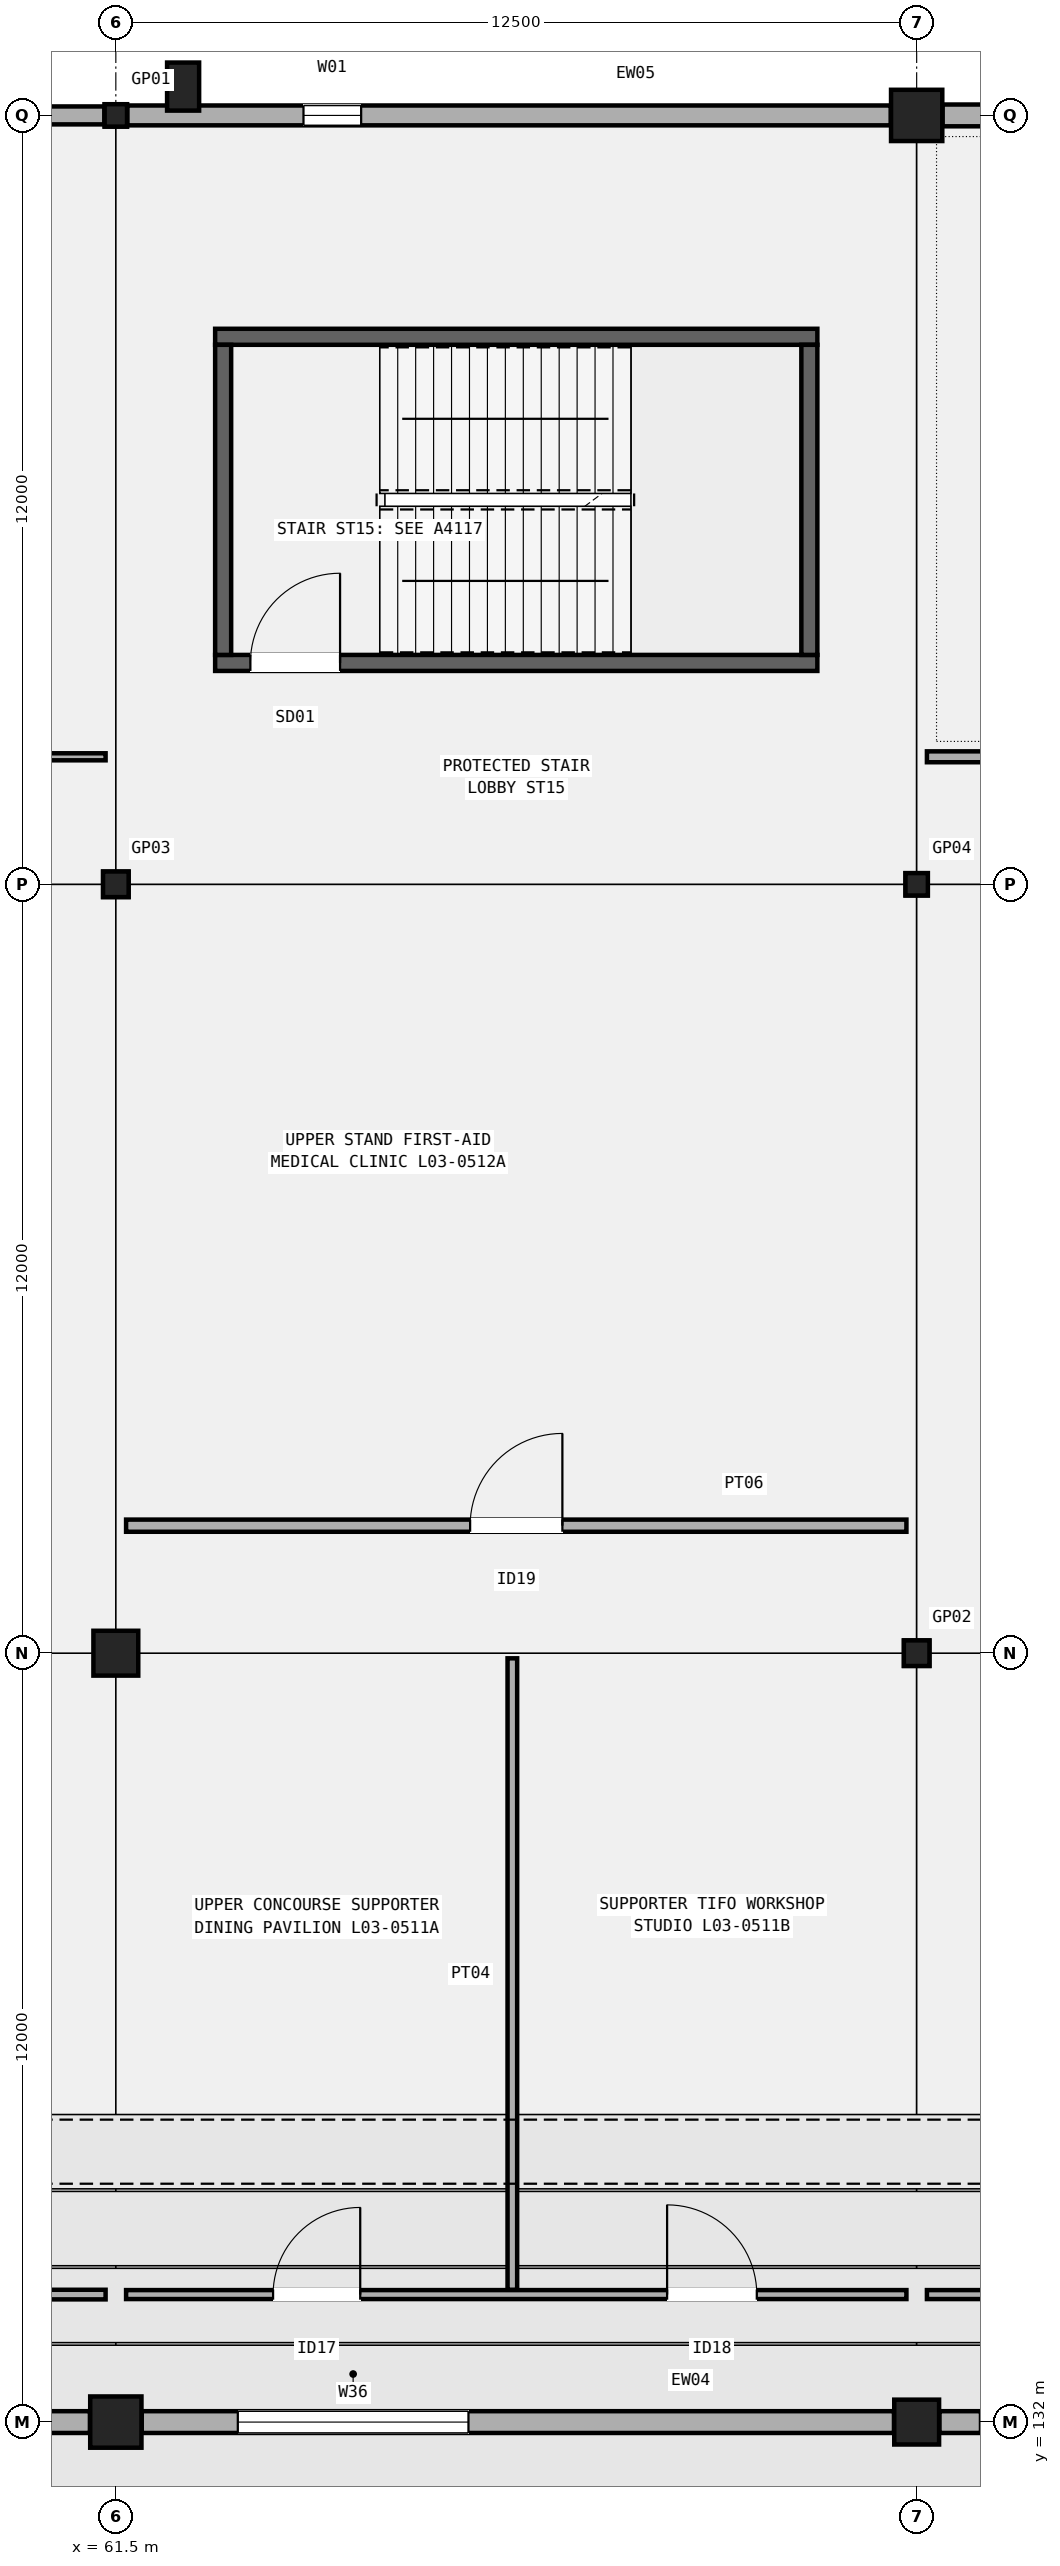
"""IFC4 building model, lengths in metres.
Left out: names, types, materials, properties, quantities, classifications, styles, units other than length and angle.
Written with IfcOpenShell. Run it as: python <this file> out.ifc"""

import sys

from ifc_helpers import new_model, si_unit, direction, frame, frame_2d, origin, origin_2d, place, context, subcontext, project, spatial, rectangle, hollow_rectangle, extrude, element, fill, save


model = new_model("IFC4")
c1 = context("Model", 3, precision=1e-05, world=origin(), true_north=direction((0.0, 1.0)))
c2 = subcontext(c1, "Body", "Model", "MODEL_VIEW")
j1 = project(units=[si_unit("LENGTHUNIT", "METRE"), si_unit("PLANEANGLEUNIT", "RADIAN")], contexts=[c1])
p1 = place(None, origin())
s1 = spatial("IfcSite", under=j1, at=p1, CompositionType="ELEMENT")
p2 = place(p1, origin())
s2 = spatial("IfcBuilding", under=s1, at=p2, CompositionType="ELEMENT")
p3 = place(p2, frame((0.0, 0.0, 15.3)))
s3 = spatial("IfcBuildingStorey", under=s2, at=p3, CompositionType="ELEMENT", Elevation=15.3)
p4 = place(p3, frame((61.5, 132.0, 0.0), z_axis=(0.0, 0.0, 1.0), x_axis=(1.0, 0.0, 0.0)))
e1 = element("IfcColumn", 1, at=p4, inside=s3, PredefinedType="COLUMN", context=c2, shape_type="SweptSolid", body=[
    extrude(rectangle(XDim=0.8, YDim=0.8, at=origin_2d()), origin(), (0.0, 0.0, 1.0), 5.1),
])
p5 = place(p3, frame((61.5, 144.0, 0.0), z_axis=(0.0, 0.0, 1.0), x_axis=(1.0, 0.0, 0.0)))
e2 = element("IfcColumn", 2, at=p5, inside=s3, PredefinedType="COLUMN", context=c2, shape_type="SweptSolid", body=[
    extrude(rectangle(XDim=0.7, YDim=0.7, at=origin_2d()), origin(), (0.0, 0.0, 1.0), 5.1),
])
p6 = place(p3, frame((61.5, 156.0, 0.0), z_axis=(0.0, 0.0, 1.0), x_axis=(1.0, 0.0, 0.0)))
e3 = element("IfcColumn", 3, at=p6, inside=s3, PredefinedType="COLUMN", context=c2, shape_type="SweptSolid", body=[
    extrude(hollow_rectangle(XDim=0.4, YDim=0.4, WallThickness=0.016, InnerFilletRadius=0.016, OuterFilletRadius=0.032, at=origin_2d()), origin(), (0.0, 0.0, 1.0), 5.1),
])
p7 = place(p3, frame((61.5, 168.0, 0.0), z_axis=(0.0, 0.0, 1.0), x_axis=(1.0, 0.0, 0.0)))
e4 = element("IfcColumn", 4, at=p7, inside=s3, PredefinedType="COLUMN", context=c2, shape_type="SweptSolid", body=[
    extrude(hollow_rectangle(XDim=0.35, YDim=0.35, WallThickness=0.016, InnerFilletRadius=0.016, OuterFilletRadius=0.032, at=origin_2d()), origin(), (0.0, 0.0, 1.0), 5.1),
])
p8 = place(p3, frame((74.0, 132.0, 0.0), z_axis=(0.0, 0.0, 1.0), x_axis=(1.0, 0.0, 0.0)))
e5 = element("IfcColumn", 5, at=p8, inside=s3, PredefinedType="COLUMN", context=c2, shape_type="SweptSolid", body=[
    extrude(rectangle(XDim=0.7, YDim=0.7, at=origin_2d()), origin(), (0.0, 0.0, 1.0), 5.1),
])
p9 = place(p3, frame((74.0, 144.0, 0.0), z_axis=(0.0, 0.0, 1.0), x_axis=(1.0, 0.0, 0.0)))
e6 = element("IfcColumn", 6, at=p9, inside=s3, PredefinedType="COLUMN", context=c2, shape_type="SweptSolid", body=[
    extrude(hollow_rectangle(XDim=0.4, YDim=0.4, WallThickness=0.016, InnerFilletRadius=0.016, OuterFilletRadius=0.032, at=origin_2d()), origin(), (0.0, 0.0, 1.0), 5.1),
])
p10 = place(p3, frame((74.0, 156.0, 0.0), z_axis=(0.0, 0.0, 1.0), x_axis=(1.0, 0.0, 0.0)))
e7 = element("IfcColumn", 7, at=p10, inside=s3, PredefinedType="COLUMN", context=c2, shape_type="SweptSolid", body=[
    extrude(hollow_rectangle(XDim=0.35, YDim=0.35, WallThickness=0.016, InnerFilletRadius=0.016, OuterFilletRadius=0.032, at=origin_2d()), origin(), (0.0, 0.0, 1.0), 5.1),
])
p11 = place(p3, frame((74.0, 168.0, 0.0), z_axis=(0.0, 0.0, 1.0), x_axis=(1.0, 0.0, 0.0)))
e8 = element("IfcColumn", 8, at=p11, inside=s3, PredefinedType="COLUMN", context=c2, shape_type="SweptSolid", body=[
    extrude(rectangle(XDim=0.8, YDim=0.8, at=origin_2d()), origin(), (0.0, 0.0, 1.0), 5.1),
])
p12 = place(p3, frame((62.55, 168.45, 0.0), z_axis=(0.0, 0.0, 1.0), x_axis=(1.0, 0.0, 0.0)))
e9 = element("IfcColumn", 9, at=p12, inside=s3, PredefinedType="PILASTER", context=c2, shape_type="SweptSolid", body=[
    extrude(rectangle(XDim=0.5, YDim=0.75, at=origin_2d()), origin(), (0.0, 0.0, 1.0), 5.1),
])
p13 = place(p3, frame((60.446, 132.0, 0.0), z_axis=(0.0, 0.0, 1.0), x_axis=(1.0, 0.0, 0.0)))
e10 = element("IfcWall", 10, at=p13, inside=s3, PredefinedType="SOLIDWALL", context=c2, shape_type="SweptSolid", body=[
    extrude(rectangle(XDim=0.65, YDim=0.34, at=frame_2d((0.325, 0.0))), origin(), (0.0, 0.0, 1.0), 4.06),
])
p14 = place(p3, frame((49.204, 168.0, 0.0), z_axis=(0.0, 0.0, 1.0), x_axis=(1.0, 0.0, 0.0)))
e11 = element("IfcWall", 11, at=p14, inside=s3, PredefinedType="SOLIDWALL", context=c2, shape_type="SweptSolid", body=[
    extrude(rectangle(XDim=12.117, YDim=0.28, at=frame_2d((6.059, 0.0))), origin(), (0.0, 0.0, 1.0), 4.06),
])
p15 = place(p14, frame((1.5, 0.0, 0.95)))
e12 = element("IfcOpeningElement", 12, at=p15, cuts=e11, PredefinedType="OPENING", context=c2, shape_type="SweptSolid", body=[
    extrude(rectangle(XDim=3.3, YDim=2.25, at=frame_2d((1.65, 1.125))), frame((0.0, 0.15, 0.0), z_axis=(0.0, -1.0, 0.0), x_axis=(1.0, 0.0, 0.0)), (0.0, 0.0, 1.0), 0.3),
])
p16 = place(p3, frame((61.904, 132.0, 0.0), z_axis=(0.0, 0.0, 1.0), x_axis=(1.0, 0.0, 0.0)))
e13 = element("IfcWall", 13, at=p16, inside=s3, PredefinedType="SOLIDWALL", context=c2, shape_type="SweptSolid", body=[
    extrude(rectangle(XDim=11.742, YDim=0.34, at=frame_2d((5.871, 0.0))), origin(), (0.0, 0.0, 1.0), 4.16),
])
p17 = place(p16, frame((1.5, 0.0, 0.95)))
e14 = element("IfcOpeningElement", 14, at=p17, cuts=e13, PredefinedType="OPENING", context=c2, shape_type="SweptSolid", body=[
    extrude(rectangle(XDim=3.6, YDim=2.15, at=frame_2d((1.8, 1.075))), frame((0.0, 0.18, 0.0), z_axis=(0.0, -1.0, 0.0), x_axis=(1.0, 0.0, 0.0)), (0.0, 0.0, 1.0), 0.36),
])
p18 = place(p3, frame((61.679, 168.0, 0.0), z_axis=(0.0, 0.0, 1.0), x_axis=(1.0, 0.0, 0.0)))
e15 = element("IfcWall", 15, at=p18, inside=s3, PredefinedType="SOLIDWALL", context=c2, shape_type="SweptSolid", body=[
    extrude(rectangle(XDim=11.917, YDim=0.31, at=frame_2d((5.958, 0.0))), origin(), (0.0, 0.0, 1.0), 4.16),
])
p19 = place(p18, frame((2.75, 0.0, 0.95)))
e16 = element("IfcOpeningElement", 16, at=p19, cuts=e15, PredefinedType="OPENING", context=c2, shape_type="SweptSolid", body=[
    extrude(rectangle(XDim=0.9, YDim=2.1, at=frame_2d((0.45, 1.05))), frame((0.0, 0.165, 0.0), z_axis=(0.0, -1.0, 0.0), x_axis=(1.0, 0.0, 0.0)), (0.0, 0.0, 1.0), 0.33),
])
p20 = place(p3, frame((74.354, 132.0, 0.0), z_axis=(0.0, 0.0, 1.0), x_axis=(1.0, 0.0, 0.0)))
e17 = element("IfcWall", 17, at=p20, inside=s3, PredefinedType="SOLIDWALL", context=c2, shape_type="SweptSolid", body=[
    extrude(rectangle(XDim=0.65, YDim=0.34, at=frame_2d((0.325, 0.0))), origin(), (0.0, 0.0, 1.0), 4.172),
])
p21 = place(p3, frame((74.404, 168.0, 0.0), z_axis=(0.0, 0.0, 1.0), x_axis=(1.0, 0.0, 0.0)))
e18 = element("IfcWall", 18, at=p21, inside=s3, PredefinedType="SOLIDWALL", context=c2, shape_type="SweptSolid", body=[
    extrude(rectangle(XDim=11.742, YDim=0.34, at=frame_2d((5.871, 0.0))), origin(), (0.0, 0.0, 1.0), 4.172),
])
p22 = place(p21, frame((1.5, 0.0, 0.95)))
e19 = element("IfcOpeningElement", 19, at=p22, cuts=e18, PredefinedType="OPENING", context=c2, shape_type="SweptSolid", body=[
    extrude(rectangle(XDim=1.05, YDim=2.2, at=frame_2d((0.525, 1.1))), frame((0.0, 0.18, 0.0), z_axis=(0.0, -1.0, 0.0), x_axis=(1.0, 0.0, 0.0)), (0.0, 0.0, 1.0), 0.36),
])
p23 = place(p3, frame((63.05, 159.455, 0.0), z_axis=(0.0, 0.0, 1.0), x_axis=(1.0, 0.0, 0.0)))
e20 = element("IfcWall", 20, at=p23, inside=s3, PredefinedType="SHEAR", context=c2, shape_type="SweptSolid", body=[
    extrude(rectangle(XDim=9.4, YDim=0.25, at=frame_2d((4.7, 0.0))), origin(), (0.0, 0.0, 1.0), 4.86),
])
p24 = place(p23, frame((0.55, 0.0, 0.0)))
e21 = element("IfcOpeningElement", 21, at=p24, cuts=e20, PredefinedType="OPENING", context=c2, shape_type="SweptSolid", body=[
    extrude(rectangle(XDim=1.4, YDim=2.15, at=frame_2d((0.7, 1.075))), frame((0.0, 0.135, 0.0), z_axis=(0.0, -1.0, 0.0), x_axis=(1.0, 0.0, 0.0)), (0.0, 0.0, 1.0), 0.27),
])
p25 = place(p3, frame((63.05, 164.545, 0.0), z_axis=(0.0, 0.0, 1.0), x_axis=(1.0, 0.0, 0.0)))
e22 = element("IfcWall", 22, at=p25, inside=s3, PredefinedType="SHEAR", context=c2, shape_type="SweptSolid", body=[
    extrude(rectangle(XDim=9.4, YDim=0.25, at=frame_2d((4.7, 0.0))), origin(), (0.0, 0.0, 1.0), 4.86),
])
for number, where, z_axis, x_axis in (
    (23, (63.175, 159.58, 0.0), (0.0, 0.0, 1.0), (0.0, 1.0, 0.0)),
    (24, (72.325, 159.58, 0.0), (0.0, 0.0, 1.0), (0.0, 1.0, 0.0)),
):
    element("IfcWall", number, at=place(p3, frame(where, z_axis=z_axis, x_axis=x_axis)), inside=s3, PredefinedType="SHEAR", context=c2, shape_type="SweptSolid", body=[
        extrude(rectangle(XDim=4.84, YDim=0.25, at=frame_2d((2.42, 0.0))), origin(), (0.0, 0.0, 1.0), 4.86),
    ])
p26 = place(p3, frame((50.92, 133.99, 0.0), z_axis=(0.0, 0.0, 1.0), x_axis=(1.0, 0.0, 0.0)))
e25 = element("IfcWall", 25, at=p26, inside=s3, PredefinedType="PARTITIONING", context=c2, shape_type="SweptSolid", body=[
    extrude(rectangle(XDim=10.42, YDim=0.15, at=frame_2d((5.21, 0.0))), origin(), (0.0, 0.0, 1.0), 2.77),
])
p27 = place(p26, frame((4.56, 0.0, 0.0)))
e26 = element("IfcOpeningElement", 26, at=p27, cuts=e25, PredefinedType="OPENING", context=c2, shape_type="SweptSolid", body=[
    extrude(rectangle(XDim=1.3, YDim=2.24, at=frame_2d((0.65, 1.12))), frame((0.0, 0.085, 0.0), z_axis=(0.0, -1.0, 0.0), x_axis=(1.0, 0.0, 0.0)), (0.0, 0.0, 1.0), 0.17),
])
p28 = place(p3, frame((50.92, 157.99, 0.0), z_axis=(0.0, 0.0, 1.0), x_axis=(1.0, 0.0, 0.0)))
e27 = element("IfcWall", 27, at=p28, inside=s3, PredefinedType="PARTITIONING", context=c2, shape_type="SweptSolid", body=[
    extrude(rectangle(XDim=10.42, YDim=0.11, at=frame_2d((5.21, 0.0))), origin(), (0.0, 0.0, 1.0), 4.22),
])
p29 = place(p28, frame((4.545, 0.0, 0.0)))
e28 = element("IfcOpeningElement", 28, at=p29, cuts=e27, PredefinedType="OPENING", context=c2, shape_type="SweptSolid", body=[
    extrude(rectangle(XDim=1.33, YDim=2.22, at=frame_2d((0.665, 1.11))), frame((0.0, 0.065, 0.0), z_axis=(0.0, -1.0, 0.0), x_axis=(1.0, 0.0, 0.0)), (0.0, 0.0, 1.0), 0.13),
])
p30 = place(p3, frame((61.66, 133.99, 0.0), z_axis=(0.0, 0.0, 1.0), x_axis=(1.0, 0.0, 0.0)))
e29 = element("IfcWall", 29, at=p30, inside=s3, PredefinedType="PARTITIONING", context=c2, shape_type="SweptSolid", body=[
    extrude(rectangle(XDim=12.18, YDim=0.14, at=frame_2d((6.09, 0.0))), origin(), (0.0, 0.0, 1.0), 2.77),
])
p31 = place(p30, frame((2.294, 0.0, 0.0)))
e30 = element("IfcOpeningElement", 30, at=p31, cuts=e29, PredefinedType="OPENING", context=c2, shape_type="SweptSolid", body=[
    extrude(rectangle(XDim=1.36, YDim=2.25, at=frame_2d((0.68, 1.125))), frame((0.0, 0.08, 0.0), z_axis=(0.0, -1.0, 0.0), x_axis=(1.0, 0.0, 0.0)), (0.0, 0.0, 1.0), 0.16),
])
p32 = place(p30, frame((8.445, 0.0, 0.0)))
e31 = element("IfcOpeningElement", 31, at=p32, cuts=e29, PredefinedType="OPENING", context=c2, shape_type="SweptSolid", body=[
    extrude(rectangle(XDim=1.4, YDim=2.24, at=frame_2d((0.7, 1.12))), frame((0.0, 0.08, 0.0), z_axis=(0.0, -1.0, 0.0), x_axis=(1.0, 0.0, 0.0)), (0.0, 0.0, 1.0), 0.16),
])
p33 = place(p3, frame((67.689, 134.065, 0.0), z_axis=(0.0, 0.0, 1.0), x_axis=(0.0, 1.0, 0.0)))
e32 = element("IfcWall", 32, at=p33, inside=s3, PredefinedType="PARTITIONING", context=c2, shape_type="SweptSolid", body=[
    extrude(rectangle(XDim=9.855, YDim=0.15, at=frame_2d((4.927, 0.0))), origin(), (0.0, 0.0, 1.0), 2.77),
])
p34 = place(p3, frame((61.66, 145.99, 0.0), z_axis=(0.0, 0.0, 1.0), x_axis=(1.0, 0.0, 0.0)))
e33 = element("IfcWall", 33, at=p34, inside=s3, PredefinedType="PARTITIONING", context=c2, shape_type="SweptSolid", body=[
    extrude(rectangle(XDim=12.18, YDim=0.19, at=frame_2d((6.09, 0.0))), origin(), (0.0, 0.0, 1.0), 4.22),
])
p35 = place(p34, frame((5.37, 0.0, 0.0)))
e34 = element("IfcOpeningElement", 34, at=p35, cuts=e33, PredefinedType="OPENING", context=c2, shape_type="SweptSolid", body=[
    extrude(rectangle(XDim=1.44, YDim=2.26, at=frame_2d((0.72, 1.13))), frame((0.0, 0.105, 0.0), z_axis=(0.0, -1.0, 0.0), x_axis=(1.0, 0.0, 0.0)), (0.0, 0.0, 1.0), 0.21),
])
p36 = place(p3, frame((74.16, 133.99, 0.0), z_axis=(0.0, 0.0, 1.0), x_axis=(1.0, 0.0, 0.0)))
e35 = element("IfcWall", 35, at=p36, inside=s3, PredefinedType="PARTITIONING", context=c2, shape_type="SweptSolid", body=[
    extrude(rectangle(XDim=12.18, YDim=0.14, at=frame_2d((6.09, 0.0))), origin(), (0.0, 0.0, 1.0), 2.77),
])
p37 = place(p36, frame((5.24, 0.0, 0.0)))
e36 = element("IfcOpeningElement", 36, at=p37, cuts=e35, PredefinedType="OPENING", context=c2, shape_type="SweptSolid", body=[
    extrude(rectangle(XDim=1.7, YDim=2.32, at=frame_2d((0.85, 1.16))), frame((0.0, 0.08, 0.0), z_axis=(0.0, -1.0, 0.0), x_axis=(1.0, 0.0, 0.0)), (0.0, 0.0, 1.0), 0.16),
])
p38 = place(p3, frame((74.16, 157.99, 0.0), z_axis=(0.0, 0.0, 1.0), x_axis=(1.0, 0.0, 0.0)))
e37 = element("IfcWall", 37, at=p38, inside=s3, PredefinedType="PARTITIONING", context=c2, shape_type="SweptSolid", body=[
    extrude(rectangle(XDim=12.18, YDim=0.17, at=frame_2d((6.09, 0.0))), origin(), (0.0, 0.0, 1.0), 4.22),
])
p39 = place(p38, frame((5.21, 0.0, 0.0)))
e38 = element("IfcOpeningElement", 38, at=p39, cuts=e37, PredefinedType="OPENING", context=c2, shape_type="SweptSolid", body=[
    extrude(rectangle(XDim=1.76, YDim=2.3, at=frame_2d((0.88, 1.15))), frame((0.0, 0.095, 0.0), z_axis=(0.0, -1.0, 0.0), x_axis=(1.0, 0.0, 0.0)), (0.0, 0.0, 1.0), 0.19),
])
p40 = place(p17, origin())
e39 = element("IfcWindow", 39, at=p40, inside=s3, PartitioningType="SINGLE_PANEL", PredefinedType="WINDOW", context=c2, shape_type="SweptSolid", body=[
    extrude(rectangle(XDim=3.6, YDim=2.15, at=frame_2d((1.8, 1.075))), frame((0.0, 0.03, 0.0), z_axis=(0.0, -1.0, 0.0), x_axis=(1.0, 0.0, 0.0)), (0.0, 0.0, 1.0), 0.06),
])
fill(e14, e39)
p41 = place(p19, origin())
e40 = element("IfcWindow", 40, at=p41, inside=s3, PartitioningType="SINGLE_PANEL", PredefinedType="WINDOW", context=c2, shape_type="SweptSolid", body=[
    extrude(rectangle(XDim=0.9, YDim=2.1, at=frame_2d((0.45, 1.05))), frame((0.0, 0.03, 0.0), z_axis=(0.0, -1.0, 0.0), x_axis=(1.0, 0.0, 0.0)), (0.0, 0.0, 1.0), 0.06),
])
fill(e16, e40)
p42 = place(p24, origin())
e41 = element("IfcDoor", 41, at=p42, inside=s3, OperationType="SINGLE_SWING_RIGHT", PredefinedType="DOOR", context=c2, shape_type="SweptSolid", body=[
    extrude(rectangle(XDim=1.4, YDim=2.15, at=frame_2d((0.7, 1.075))), frame((0.0, 0.025, 0.0), z_axis=(0.0, -1.0, 0.0), x_axis=(1.0, 0.0, 0.0)), (0.0, 0.0, 1.0), 0.05),
])
fill(e21, e41)
p43 = place(p31, origin())
e42 = element("IfcDoor", 42, at=p43, inside=s3, OperationType="SINGLE_SWING_RIGHT", PredefinedType="DOOR", context=c2, shape_type="SweptSolid", body=[
    extrude(rectangle(XDim=1.36, YDim=2.25, at=frame_2d((0.68, 1.125))), frame((0.0, 0.025, 0.0), z_axis=(0.0, -1.0, 0.0), x_axis=(1.0, 0.0, 0.0)), (0.0, 0.0, 1.0), 0.05),
])
fill(e30, e42)
p44 = place(p32, origin())
e43 = element("IfcDoor", 43, at=p44, inside=s3, OperationType="SINGLE_SWING_LEFT", PredefinedType="DOOR", context=c2, shape_type="SweptSolid", body=[
    extrude(rectangle(XDim=1.4, YDim=2.24, at=frame_2d((0.7, 1.12))), frame((0.0, 0.025, 0.0), z_axis=(0.0, -1.0, 0.0), x_axis=(1.0, 0.0, 0.0)), (0.0, 0.0, 1.0), 0.05),
])
fill(e31, e43)
p45 = place(p35, origin())
e44 = element("IfcDoor", 44, at=p45, inside=s3, OperationType="SINGLE_SWING_RIGHT", PredefinedType="DOOR", context=c2, shape_type="SweptSolid", body=[
    extrude(rectangle(XDim=1.44, YDim=2.26, at=frame_2d((0.72, 1.13))), frame((0.0, 0.025, 0.0), z_axis=(0.0, -1.0, 0.0), x_axis=(1.0, 0.0, 0.0)), (0.0, 0.0, 1.0), 0.05),
])
fill(e34, e44)
save(model, sys.argv[1])
